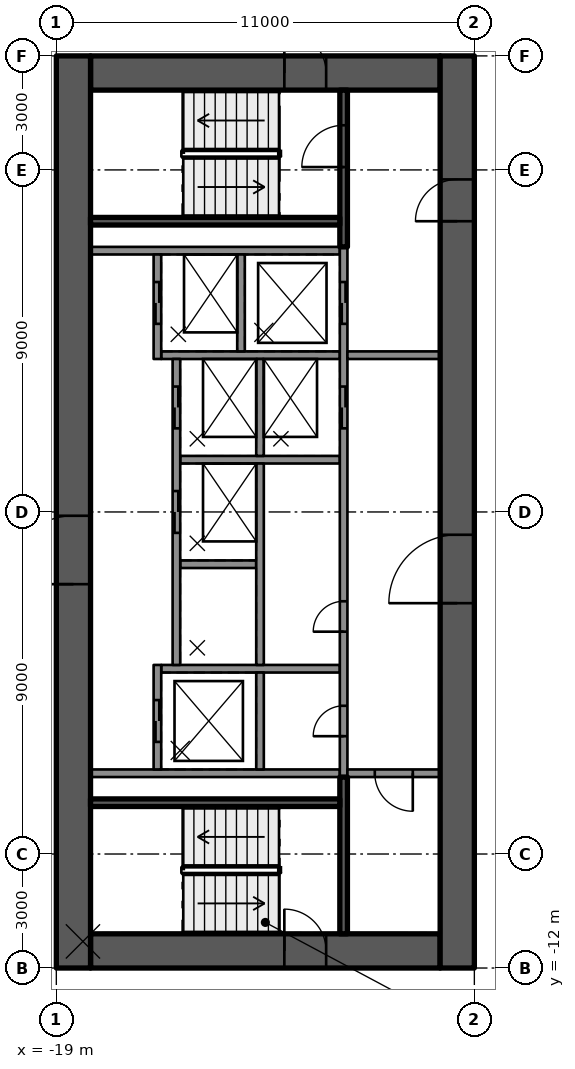
"""IFC4 building model, lengths in metres.
Left out: names, types, materials, properties, quantities, classifications, styles, units other than length and angle.
Written with IfcOpenShell. Run it as: python <this file> out.ifc"""

import sys

from ifc_helpers import new_model, si_unit, direction, frame, frame_2d, origin, place, context, subcontext, project, spatial, rectangle, extrude, element, fill, save


model = new_model("IFC4")
c1 = context("Model", 3, precision=1e-05, world=origin(), true_north=direction((0.0, 1.0)))
c2 = subcontext(c1, "Body", "Model", "MODEL_VIEW")
j1 = project(units=[si_unit("LENGTHUNIT", "METRE"), si_unit("PLANEANGLEUNIT", "RADIAN")], contexts=[c1])
p1 = place(None, origin())
s1 = spatial("IfcSite", under=j1, at=p1, CompositionType="ELEMENT")
p2 = place(p1, origin())
s2 = spatial("IfcBuilding", under=s1, at=p2, CompositionType="ELEMENT")
p3 = place(p2, frame((0.0, 0.0, 159.6)))
s3 = spatial("IfcBuildingStorey", under=s2, at=p3, CompositionType="ELEMENT", Elevation=159.6)
p4 = place(p3, frame((-18.1, 11.55, 0.0), z_axis=(0.0, 0.0, 1.0), x_axis=(1.0, 0.0, 0.0)))
e1 = element("IfcWall", 1, at=p4, inside=s3, PredefinedType="SHEAR", context=c2, shape_type="SweptSolid", body=[
    extrude(rectangle(XDim=9.2, YDim=0.9, at=frame_2d((4.6, 0.0))), origin(), (0.0, 0.0, 1.0), 3.5),
])
p5 = place(p4, frame((5.1, 0.0, 0.0)))
e2 = element("IfcOpeningElement", 2, at=p5, cuts=e1, PredefinedType="OPENING", context=c2, shape_type="SweptSolid", body=[
    extrude(rectangle(XDim=1.1, YDim=2.1, at=frame_2d((0.55, 1.05))), frame((0.0, 0.46, 0.0), z_axis=(0.0, -1.0, 0.0), x_axis=(1.0, 0.0, 0.0)), (0.0, 0.0, 1.0), 0.92),
])
p6 = place(p3, frame((-18.1, -11.55, 0.0), z_axis=(0.0, 0.0, 1.0), x_axis=(1.0, 0.0, 0.0)))
e3 = element("IfcWall", 3, at=p6, inside=s3, PredefinedType="SHEAR", context=c2, shape_type="SweptSolid", body=[
    extrude(rectangle(XDim=9.2, YDim=0.9, at=frame_2d((4.6, 0.0))), origin(), (0.0, 0.0, 1.0), 3.5),
])
p7 = place(p6, frame((5.1, 0.0, 0.0)))
e4 = element("IfcOpeningElement", 4, at=p7, cuts=e3, PredefinedType="OPENING", context=c2, shape_type="SweptSolid", body=[
    extrude(rectangle(XDim=1.1, YDim=2.1, at=frame_2d((0.55, 1.05))), frame((0.0, 0.46, 0.0), z_axis=(0.0, -1.0, 0.0), x_axis=(1.0, 0.0, 0.0)), (0.0, 0.0, 1.0), 0.92),
])
p8 = place(p3, frame((-18.55, -12.0, 0.0), z_axis=(0.0, 0.0, 1.0), x_axis=(0.0, 1.0, 0.0)))
e5 = element("IfcWall", 5, at=p8, inside=s3, PredefinedType="SHEAR", context=c2, shape_type="SweptSolid", body=[
    extrude(rectangle(XDim=24.0, YDim=0.9, at=frame_2d((12.0, 0.0))), origin(), (0.0, 0.0, 1.0), 3.5),
])
p9 = place(p8, frame((10.1, 0.0, 0.0)))
e6 = element("IfcOpeningElement", 6, at=p9, cuts=e5, PredefinedType="OPENING", context=c2, shape_type="SweptSolid", body=[
    extrude(rectangle(XDim=1.8, YDim=2.1, at=frame_2d((0.9, 1.05))), frame((0.0, 0.46, 0.0), z_axis=(0.0, -1.0, 0.0), x_axis=(1.0, 0.0, 0.0)), (0.0, 0.0, 1.0), 0.92),
])
p10 = place(p3, frame((-8.45, -12.0, 0.0), z_axis=(0.0, 0.0, 1.0), x_axis=(0.0, 1.0, 0.0)))
e7 = element("IfcWall", 7, at=p10, inside=s3, PredefinedType="SHEAR", context=c2, shape_type="SweptSolid", body=[
    extrude(rectangle(XDim=24.0, YDim=0.9, at=frame_2d((12.0, 0.0))), origin(), (0.0, 0.0, 1.0), 3.5),
])
p11 = place(p10, frame((9.6, 0.0, 0.0)))
e8 = element("IfcOpeningElement", 8, at=p11, cuts=e7, PredefinedType="OPENING", context=c2, shape_type="SweptSolid", body=[
    extrude(rectangle(XDim=1.8, YDim=2.1, at=frame_2d((0.9, 1.05))), frame((0.0, 0.46, 0.0), z_axis=(0.0, -1.0, 0.0), x_axis=(1.0, 0.0, 0.0)), (0.0, 0.0, 1.0), 0.92),
])
p12 = place(p10, frame((19.65, 0.0, 0.0)))
e9 = element("IfcOpeningElement", 9, at=p12, cuts=e7, PredefinedType="OPENING", context=c2, shape_type="SweptSolid", body=[
    extrude(rectangle(XDim=1.1, YDim=2.1, at=frame_2d((0.55, 1.05))), frame((0.0, 0.46, 0.0), z_axis=(0.0, -1.0, 0.0), x_axis=(1.0, 0.0, 0.0)), (0.0, 0.0, 1.0), 0.92),
])
for number, where, z_axis, x_axis in (
    (10, (-11.54, 6.875, 0.0), (0.0, 0.0, 1.0), (-1.0, 0.0, 0.0)),
    (11, (-11.54, -6.875, 0.0), (0.0, 0.0, 1.0), (-1.0, 0.0, 0.0)),
):
    element("IfcWall", number, at=place(p3, frame(where, z_axis=z_axis, x_axis=x_axis)), inside=s3, PredefinedType="SOLIDWALL", context=c2, shape_type="SweptSolid", body=[
        extrude(rectangle(XDim=6.56, YDim=0.2, at=frame_2d((3.28, 0.0))), origin(), (0.0, 0.0, 1.0), 3.09),
    ])
p13 = place(p3, frame((-11.54, -4.125, 0.0), z_axis=(0.0, 0.0, 1.0), x_axis=(-1.0, 0.0, 0.0)))
e12 = element("IfcWall", 12, at=p13, inside=s3, PredefinedType="SOLIDWALL", context=c2, shape_type="SweptSolid", body=[
    extrude(rectangle(XDim=4.7, YDim=0.2, at=frame_2d((2.35, 0.0))), origin(), (0.0, 0.0, 1.0), 3.09),
])
p14 = place(p3, frame((-13.74, -1.375, 0.0), z_axis=(0.0, 0.0, 1.0), x_axis=(-1.0, 0.0, 0.0)))
e13 = element("IfcWall", 13, at=p14, inside=s3, PredefinedType="SOLIDWALL", context=c2, shape_type="SweptSolid", body=[
    extrude(rectangle(XDim=2.0, YDim=0.2, at=frame_2d((1.0, 0.0))), origin(), (0.0, 0.0, 1.0), 3.09),
])
p15 = place(p3, frame((-11.54, 1.375, 0.0), z_axis=(0.0, 0.0, 1.0), x_axis=(-1.0, 0.0, 0.0)))
e14 = element("IfcWall", 14, at=p15, inside=s3, PredefinedType="SOLIDWALL", context=c2, shape_type="SweptSolid", body=[
    extrude(rectangle(XDim=4.2, YDim=0.2, at=frame_2d((2.1, 0.0))), origin(), (0.0, 0.0, 1.0), 3.09),
])
p16 = place(p3, frame((-11.54, 4.125, 0.0), z_axis=(0.0, 0.0, 1.0), x_axis=(-1.0, 0.0, 0.0)))
e15 = element("IfcWall", 15, at=p16, inside=s3, PredefinedType="SOLIDWALL", context=c2, shape_type="SweptSolid", body=[
    extrude(rectangle(XDim=4.7, YDim=0.2, at=frame_2d((2.35, 0.0))), origin(), (0.0, 0.0, 1.0), 3.09),
])
p17 = place(p3, frame((-11.44, -6.975, 0.0), z_axis=(0.0, 0.0, 1.0), x_axis=(0.0, 1.0, 0.0)))
e16 = element("IfcWall", 16, at=p17, inside=s3, PredefinedType="SOLIDWALL", context=c2, shape_type="SweptSolid", body=[
    extrude(rectangle(XDim=13.95, YDim=0.2, at=frame_2d((6.975, 0.0))), origin(), (0.0, 0.0, 1.0), 3.09),
])
p18 = place(p17, frame((9.175, 0.0, 0.0)))
e17 = element("IfcOpeningElement", 17, at=p18, cuts=e16, PredefinedType="OPENING", context=c2, shape_type="SweptSolid", body=[
    extrude(rectangle(XDim=1.1, YDim=2.1, at=frame_2d((0.55, 1.05))), frame((0.0, 0.11, 0.0), z_axis=(0.0, -1.0, 0.0), x_axis=(1.0, 0.0, 0.0)), (0.0, 0.0, 1.0), 0.22),
])
p19 = place(p17, frame((11.925, 0.0, 0.0)))
e18 = element("IfcOpeningElement", 18, at=p19, cuts=e16, PredefinedType="OPENING", context=c2, shape_type="SweptSolid", body=[
    extrude(rectangle(XDim=1.1, YDim=2.1, at=frame_2d((0.55, 1.05))), frame((0.0, 0.11, 0.0), z_axis=(0.0, -1.0, 0.0), x_axis=(1.0, 0.0, 0.0)), (0.0, 0.0, 1.0), 0.22),
])
p20 = place(p17, frame((1.075, 0.0, 0.0)))
e19 = element("IfcOpeningElement", 19, at=p20, cuts=e16, PredefinedType="OPENING", context=c2, shape_type="SweptSolid", body=[
    extrude(rectangle(XDim=0.8, YDim=2.1, at=frame_2d((0.4, 1.05))), frame((0.0, 0.11, 0.0), z_axis=(0.0, -1.0, 0.0), x_axis=(1.0, 0.0, 0.0)), (0.0, 0.0, 1.0), 0.22),
])
p21 = place(p17, frame((3.825, 0.0, 0.0)))
e20 = element("IfcOpeningElement", 20, at=p21, cuts=e16, PredefinedType="OPENING", context=c2, shape_type="SweptSolid", body=[
    extrude(rectangle(XDim=0.8, YDim=2.1, at=frame_2d((0.4, 1.05))), frame((0.0, 0.11, 0.0), z_axis=(0.0, -1.0, 0.0), x_axis=(1.0, 0.0, 0.0)), (0.0, 0.0, 1.0), 0.22),
])
p22 = place(p3, frame((-13.64, -6.775, 0.0), z_axis=(0.0, 0.0, 1.0), x_axis=(0.0, 1.0, 0.0)))
e21 = element("IfcWall", 21, at=p22, inside=s3, PredefinedType="SOLIDWALL", context=c2, shape_type="SweptSolid", body=[
    extrude(rectangle(XDim=2.55, YDim=0.2, at=frame_2d((1.275, 0.0))), origin(), (0.0, 0.0, 1.0), 3.09),
])
p23 = place(p3, frame((-13.64, -4.025, 0.0), z_axis=(0.0, 0.0, 1.0), x_axis=(0.0, 1.0, 0.0)))
e22 = element("IfcWall", 22, at=p23, inside=s3, PredefinedType="SOLIDWALL", context=c2, shape_type="SweptSolid", body=[
    extrude(rectangle(XDim=5.3, YDim=0.2, at=frame_2d((2.65, 0.0))), origin(), (0.0, 0.0, 1.0), 3.09),
])
for number, where, z_axis, x_axis in (
    (23, (-13.64, 1.475, 0.0), (0.0, 0.0, 1.0), (0.0, 1.0, 0.0)),
    (24, (-14.14, 4.225, 0.0), (0.0, 0.0, 1.0), (0.0, 1.0, 0.0)),
):
    element("IfcWall", number, at=place(p3, frame(where, z_axis=z_axis, x_axis=x_axis)), inside=s3, PredefinedType="SOLIDWALL", context=c2, shape_type="SweptSolid", body=[
        extrude(rectangle(XDim=2.55, YDim=0.2, at=frame_2d((1.275, 0.0))), origin(), (0.0, 0.0, 1.0), 3.09),
    ])
p24 = place(p3, frame((-16.34, -6.775, 0.0), z_axis=(0.0, 0.0, 1.0), x_axis=(0.0, 1.0, 0.0)))
e25 = element("IfcWall", 25, at=p24, inside=s3, PredefinedType="SOLIDWALL", context=c2, shape_type="SweptSolid", body=[
    extrude(rectangle(XDim=2.75, YDim=0.2, at=frame_2d((1.375, 0.0))), origin(), (0.0, 0.0, 1.0), 3.09),
])
p25 = place(p24, frame((0.725, 0.0, 0.0)))
e26 = element("IfcOpeningElement", 26, at=p25, cuts=e25, PredefinedType="OPENING", context=c2, shape_type="SweptSolid", body=[
    extrude(rectangle(XDim=1.1, YDim=2.1, at=frame_2d((0.55, 1.05))), frame((0.0, 0.11, 0.0), z_axis=(0.0, -1.0, 0.0), x_axis=(1.0, 0.0, 0.0)), (0.0, 0.0, 1.0), 0.22),
])
p26 = place(p3, frame((-15.84, -4.025, 0.0), z_axis=(0.0, 0.0, 1.0), x_axis=(0.0, 1.0, 0.0)))
e27 = element("IfcWall", 27, at=p26, inside=s3, PredefinedType="SOLIDWALL", context=c2, shape_type="SweptSolid", body=[
    extrude(rectangle(XDim=8.05, YDim=0.2, at=frame_2d((4.025, 0.0))), origin(), (0.0, 0.0, 1.0), 3.09),
])
p27 = place(p26, frame((3.475, 0.0, 0.0)))
e28 = element("IfcOpeningElement", 28, at=p27, cuts=e27, PredefinedType="OPENING", context=c2, shape_type="SweptSolid", body=[
    extrude(rectangle(XDim=1.1, YDim=2.1, at=frame_2d((0.55, 1.05))), frame((0.0, 0.11, 0.0), z_axis=(0.0, -1.0, 0.0), x_axis=(1.0, 0.0, 0.0)), (0.0, 0.0, 1.0), 0.22),
])
p28 = place(p26, frame((6.225, 0.0, 0.0)))
e29 = element("IfcOpeningElement", 29, at=p28, cuts=e27, PredefinedType="OPENING", context=c2, shape_type="SweptSolid", body=[
    extrude(rectangle(XDim=1.1, YDim=2.1, at=frame_2d((0.55, 1.05))), frame((0.0, 0.11, 0.0), z_axis=(0.0, -1.0, 0.0), x_axis=(1.0, 0.0, 0.0)), (0.0, 0.0, 1.0), 0.22),
])
p29 = place(p3, frame((-16.34, 4.025, 0.0), z_axis=(0.0, 0.0, 1.0), x_axis=(0.0, 1.0, 0.0)))
e30 = element("IfcWall", 30, at=p29, inside=s3, PredefinedType="SOLIDWALL", context=c2, shape_type="SweptSolid", body=[
    extrude(rectangle(XDim=2.75, YDim=0.2, at=frame_2d((1.375, 0.0))), origin(), (0.0, 0.0, 1.0), 3.09),
])
p30 = place(p29, frame((0.925, 0.0, 0.0)))
e31 = element("IfcOpeningElement", 31, at=p30, cuts=e30, PredefinedType="OPENING", context=c2, shape_type="SweptSolid", body=[
    extrude(rectangle(XDim=1.1, YDim=2.1, at=frame_2d((0.55, 1.05))), frame((0.0, 0.11, 0.0), z_axis=(0.0, -1.0, 0.0), x_axis=(1.0, 0.0, 0.0)), (0.0, 0.0, 1.0), 0.22),
])
p31 = place(p3, frame((-11.44, 6.975, 0.0), z_axis=(0.0, 0.0, 1.0), x_axis=(0.0, 1.0, 0.0)))
e32 = element("IfcWall", 32, at=p31, inside=s3, PredefinedType="SOLIDWALL", context=c2, shape_type="SweptSolid", body=[
    extrude(rectangle(XDim=4.125, YDim=0.2, at=frame_2d((2.062, 0.0))), origin(), (0.0, 0.0, 1.0), 3.09),
])
p32 = place(p31, frame((2.1, 0.0, 0.0)))
e33 = element("IfcOpeningElement", 33, at=p32, cuts=e32, PredefinedType="OPENING", context=c2, shape_type="SweptSolid", body=[
    extrude(rectangle(XDim=1.1, YDim=2.1, at=frame_2d((0.55, 1.05))), frame((0.0, 0.11, 0.0), z_axis=(0.0, -1.0, 0.0), x_axis=(1.0, 0.0, 0.0)), (0.0, 0.0, 1.0), 0.22),
])
p33 = place(p3, frame((-11.54, 7.65, 0.0), z_axis=(0.0, 0.0, 1.0), x_axis=(-1.0, 0.0, 0.0)))
e34 = element("IfcWall", 34, at=p33, inside=s3, PredefinedType="SOLIDWALL", context=c2, shape_type="SweptSolid", body=[
    extrude(rectangle(XDim=6.56, YDim=0.2, at=frame_2d((3.28, 0.0))), origin(), (0.0, 0.0, 1.0), 3.09),
])
p34 = place(p3, frame((-11.44, -11.1, 0.0), z_axis=(0.0, 0.0, 1.0), x_axis=(0.0, 1.0, 0.0)))
e35 = element("IfcWall", 35, at=p34, inside=s3, PredefinedType="SOLIDWALL", context=c2, shape_type="SweptSolid", body=[
    extrude(rectangle(XDim=4.125, YDim=0.2, at=frame_2d((2.062, 0.0))), origin(), (0.0, 0.0, 1.0), 3.09),
])
p35 = place(p3, frame((-11.54, -7.65, 0.0), z_axis=(0.0, 0.0, 1.0), x_axis=(-1.0, 0.0, 0.0)))
e36 = element("IfcWall", 36, at=p35, inside=s3, PredefinedType="SOLIDWALL", context=c2, shape_type="SweptSolid", body=[
    extrude(rectangle(XDim=6.56, YDim=0.2, at=frame_2d((3.28, 0.0))), origin(), (0.0, 0.0, 1.0), 3.09),
])
p36 = place(p3, frame((-8.9, 4.125, 0.0), z_axis=(0.0, 0.0, 1.0), x_axis=(-1.0, 0.0, 0.0)))
e37 = element("IfcWall", 37, at=p36, inside=s3, PredefinedType="PARTITIONING", context=c2, shape_type="SweptSolid", body=[
    extrude(rectangle(XDim=2.44, YDim=0.2, at=frame_2d((1.22, 0.0))), origin(), (0.0, 0.0, 1.0), 3.09),
])
p37 = place(p3, frame((-8.9, -6.875, 0.0), z_axis=(0.0, 0.0, 1.0), x_axis=(-1.0, 0.0, 0.0)))
e38 = element("IfcWall", 38, at=p37, inside=s3, PredefinedType="PARTITIONING", context=c2, shape_type="SweptSolid", body=[
    extrude(rectangle(XDim=2.44, YDim=0.2, at=frame_2d((1.22, 0.0))), origin(), (0.0, 0.0, 1.0), 3.09),
])
p38 = place(p37, frame((0.72, 0.0, 0.0)))
e39 = element("IfcOpeningElement", 39, at=p38, cuts=e38, PredefinedType="OPENING", context=c2, shape_type="SweptSolid", body=[
    extrude(rectangle(XDim=1.0, YDim=2.1, at=frame_2d((0.5, 1.05))), frame((0.0, 0.11, 0.0), z_axis=(0.0, -1.0, 0.0), x_axis=(1.0, 0.0, 0.0)), (0.0, 0.0, 1.0), 0.22),
])
p39 = place(p25, origin())
e40 = element("IfcDoor", 40, at=p39, inside=s3, OperationType="DOUBLE_DOOR_SLIDING", PredefinedType="DOOR", context=c2, shape_type="SweptSolid", body=[
    extrude(rectangle(XDim=1.1, YDim=2.1, at=frame_2d((0.55, 1.05))), frame((0.0, 0.025, 0.0), z_axis=(0.0, -1.0, 0.0), x_axis=(1.0, 0.0, 0.0)), (0.0, 0.0, 1.0), 0.05),
])
fill(e26, e40)
p40 = place(p27, origin())
e41 = element("IfcDoor", 41, at=p40, inside=s3, OperationType="DOUBLE_DOOR_SLIDING", PredefinedType="DOOR", context=c2, shape_type="SweptSolid", body=[
    extrude(rectangle(XDim=1.1, YDim=2.1, at=frame_2d((0.55, 1.05))), frame((0.0, 0.025, 0.0), z_axis=(0.0, -1.0, 0.0), x_axis=(1.0, 0.0, 0.0)), (0.0, 0.0, 1.0), 0.05),
])
fill(e28, e41)
p41 = place(p18, origin())
e42 = element("IfcDoor", 42, at=p41, inside=s3, OperationType="DOUBLE_DOOR_SLIDING", PredefinedType="DOOR", context=c2, shape_type="SweptSolid", body=[
    extrude(rectangle(XDim=1.1, YDim=2.1, at=frame_2d((0.55, 1.05))), frame((0.0, 0.025, 0.0), z_axis=(0.0, -1.0, 0.0), x_axis=(1.0, 0.0, 0.0)), (0.0, 0.0, 1.0), 0.05),
])
fill(e17, e42)
p42 = place(p28, origin())
e43 = element("IfcDoor", 43, at=p42, inside=s3, OperationType="DOUBLE_DOOR_SLIDING", PredefinedType="DOOR", context=c2, shape_type="SweptSolid", body=[
    extrude(rectangle(XDim=1.1, YDim=2.1, at=frame_2d((0.55, 1.05))), frame((0.0, 0.025, 0.0), z_axis=(0.0, -1.0, 0.0), x_axis=(1.0, 0.0, 0.0)), (0.0, 0.0, 1.0), 0.05),
])
fill(e29, e43)
p43 = place(p19, origin())
e44 = element("IfcDoor", 44, at=p43, inside=s3, OperationType="DOUBLE_DOOR_SLIDING", PredefinedType="DOOR", context=c2, shape_type="SweptSolid", body=[
    extrude(rectangle(XDim=1.1, YDim=2.1, at=frame_2d((0.55, 1.05))), frame((0.0, 0.025, 0.0), z_axis=(0.0, -1.0, 0.0), x_axis=(1.0, 0.0, 0.0)), (0.0, 0.0, 1.0), 0.05),
])
fill(e18, e44)
p44 = place(p30, origin())
e45 = element("IfcDoor", 45, at=p44, inside=s3, OperationType="DOUBLE_DOOR_SLIDING", PredefinedType="DOOR", context=c2, shape_type="SweptSolid", body=[
    extrude(rectangle(XDim=1.1, YDim=2.1, at=frame_2d((0.55, 1.05))), frame((0.0, 0.025, 0.0), z_axis=(0.0, -1.0, 0.0), x_axis=(1.0, 0.0, 0.0)), (0.0, 0.0, 1.0), 0.05),
])
fill(e31, e45)
p45 = place(p20, origin())
e46 = element("IfcDoor", 46, at=p45, inside=s3, OperationType="SINGLE_SWING_LEFT", PredefinedType="DOOR", context=c2, shape_type="SweptSolid", body=[
    extrude(rectangle(XDim=0.8, YDim=2.1, at=frame_2d((0.4, 1.05))), frame((0.0, 0.025, 0.0), z_axis=(0.0, -1.0, 0.0), x_axis=(1.0, 0.0, 0.0)), (0.0, 0.0, 1.0), 0.05),
])
fill(e19, e46)
p46 = place(p21, origin())
e47 = element("IfcDoor", 47, at=p46, inside=s3, OperationType="SINGLE_SWING_LEFT", PredefinedType="DOOR", context=c2, shape_type="SweptSolid", body=[
    extrude(rectangle(XDim=0.8, YDim=2.1, at=frame_2d((0.4, 1.05))), frame((0.0, 0.025, 0.0), z_axis=(0.0, -1.0, 0.0), x_axis=(1.0, 0.0, 0.0)), (0.0, 0.0, 1.0), 0.05),
])
fill(e20, e47)
p47 = place(p11, origin())
e48 = element("IfcDoor", 48, at=p47, inside=s3, OperationType="SINGLE_SWING_LEFT", PredefinedType="DOOR", context=c2, shape_type="SweptSolid", body=[
    extrude(rectangle(XDim=1.8, YDim=2.1, at=frame_2d((0.9, 1.05))), frame((0.0, 0.025, 0.0), z_axis=(0.0, -1.0, 0.0), x_axis=(1.0, 0.0, 0.0)), (0.0, 0.0, 1.0), 0.05),
])
fill(e8, e48)
p48 = place(p9, origin())
e49 = element("IfcDoor", 49, at=p48, inside=s3, OperationType="SINGLE_SWING_LEFT", PredefinedType="DOOR", context=c2, shape_type="SweptSolid", body=[
    extrude(rectangle(XDim=1.8, YDim=2.1, at=frame_2d((0.9, 1.05))), frame((0.0, 0.025, 0.0), z_axis=(0.0, -1.0, 0.0), x_axis=(1.0, 0.0, 0.0)), (0.0, 0.0, 1.0), 0.05),
])
fill(e6, e49)
p49 = place(p12, origin())
e50 = element("IfcDoor", 50, at=p49, inside=s3, OperationType="SINGLE_SWING_RIGHT", PredefinedType="DOOR", context=c2, shape_type="SweptSolid", body=[
    extrude(rectangle(XDim=1.1, YDim=2.1, at=frame_2d((0.55, 1.05))), frame((0.0, 0.025, 0.0), z_axis=(0.0, -1.0, 0.0), x_axis=(1.0, 0.0, 0.0)), (0.0, 0.0, 1.0), 0.05),
])
fill(e9, e50)
p50 = place(p5, origin())
e51 = element("IfcDoor", 51, at=p50, inside=s3, OperationType="SINGLE_SWING_RIGHT", PredefinedType="DOOR", context=c2, shape_type="SweptSolid", body=[
    extrude(rectangle(XDim=1.1, YDim=2.1, at=frame_2d((0.55, 1.05))), frame((0.0, 0.025, 0.0), z_axis=(0.0, -1.0, 0.0), x_axis=(1.0, 0.0, 0.0)), (0.0, 0.0, 1.0), 0.05),
])
fill(e2, e51)
p51 = place(p7, origin())
e52 = element("IfcDoor", 52, at=p51, inside=s3, OperationType="SINGLE_SWING_RIGHT", PredefinedType="DOOR", context=c2, shape_type="SweptSolid", body=[
    extrude(rectangle(XDim=1.1, YDim=2.1, at=frame_2d((0.55, 1.05))), frame((0.0, 0.025, 0.0), z_axis=(0.0, -1.0, 0.0), x_axis=(1.0, 0.0, 0.0)), (0.0, 0.0, 1.0), 0.05),
])
fill(e4, e52)
p52 = place(p32, origin())
e53 = element("IfcDoor", 53, at=p52, inside=s3, OperationType="SINGLE_SWING_RIGHT", PredefinedType="DOOR", context=c2, shape_type="SweptSolid", body=[
    extrude(rectangle(XDim=1.1, YDim=2.1, at=frame_2d((0.55, 1.05))), frame((0.0, 0.025, 0.0), z_axis=(0.0, -1.0, 0.0), x_axis=(1.0, 0.0, 0.0)), (0.0, 0.0, 1.0), 0.05),
])
fill(e33, e53)
p53 = place(p38, origin())
e54 = element("IfcDoor", 54, at=p53, inside=s3, OperationType="SINGLE_SWING_RIGHT", PredefinedType="DOOR", context=c2, shape_type="SweptSolid", body=[
    extrude(rectangle(XDim=1.0, YDim=2.1, at=frame_2d((0.5, 1.05))), frame((0.0, 0.025, 0.0), z_axis=(0.0, -1.0, 0.0), x_axis=(1.0, 0.0, 0.0)), (0.0, 0.0, 1.0), 0.05),
])
fill(e39, e54)
save(model, sys.argv[1])
